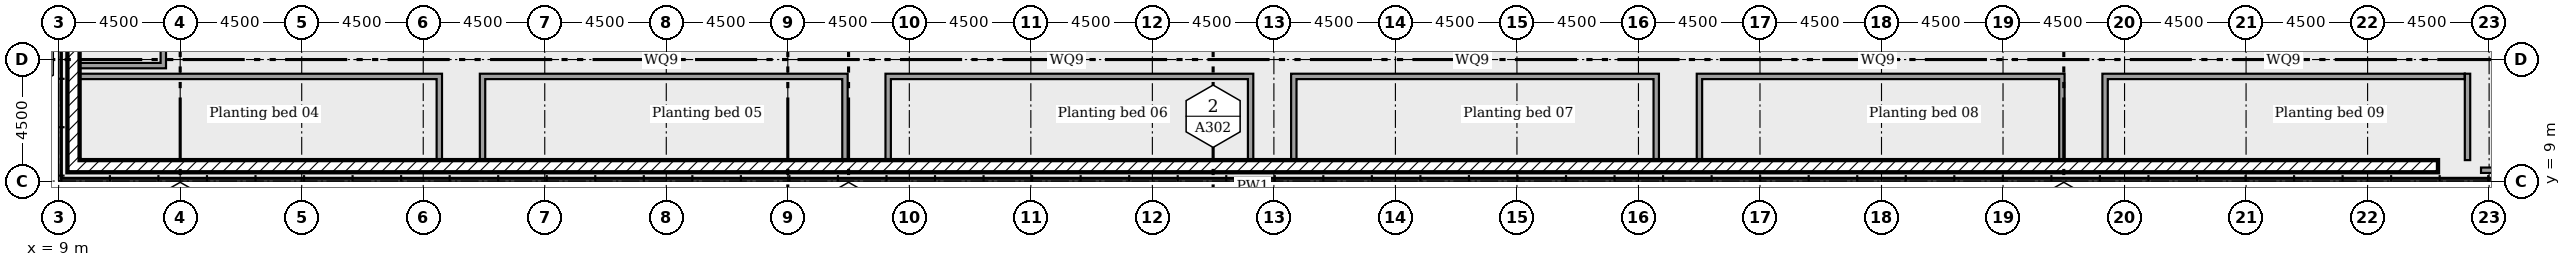
"""IFC4 building model, lengths in metres.
Left out: names, types, materials, properties, quantities, classifications, styles, units other than length and angle.
Written with IfcOpenShell. Run it as: python <this file> out.ifc"""

import sys

from ifc_helpers import new_model, si_unit, direction, frame, frame_2d, origin, place, context, subcontext, project, spatial, rectangle, extrude, element, save


model = new_model("IFC4")
c1 = context("Model", 3, precision=1e-05, world=origin(), true_north=direction((0.0, 1.0)))
c2 = subcontext(c1, "Body", "Model", "MODEL_VIEW")
j1 = project(units=[si_unit("LENGTHUNIT", "METRE"), si_unit("PLANEANGLEUNIT", "RADIAN")], contexts=[c1])
p1 = place(None, origin())
s1 = spatial("IfcSite", under=j1, at=p1, CompositionType="ELEMENT")
p2 = place(p1, origin())
s2 = spatial("IfcBuilding", under=s1, at=p2, CompositionType="ELEMENT")
p3 = place(p2, frame((0.0, 0.0, 11.5)))
s3 = spatial("IfcBuildingStorey", under=s2, at=p3, CompositionType="ELEMENT", Elevation=11.5)
p4 = place(p3, frame((9.325, 9.55, 0.0)))
e1 = element("IfcWall", 1, at=p4, inside=s3, PredefinedType="SOLIDWALL", context=c2, shape_type="SweptSolid", body=[
    extrude(rectangle(XDim=87.782, YDim=0.45, at=frame_2d((43.891, 0.0))), origin(), (0.0, 0.0, 1.0), 0.6),
])
p5 = place(p3, frame((9.55, 89.225, 0.0), z_axis=(0.0, 0.0, 1.0), x_axis=(0.0, -1.0, 0.0)))
e2 = element("IfcWall", 2, at=p5, inside=s3, PredefinedType="SOLIDWALL", context=c2, shape_type="SweptSolid", body=[
    extrude(rectangle(XDim=79.45, YDim=0.45, at=frame_2d((39.725, 0.0))), origin(), (0.0, 0.0, 1.0), 0.6),
])
p6 = place(p3, frame((23.096, 9.775, 0.0), z_axis=(0.0, 0.0, 1.0), x_axis=(0.0, 1.0, 0.0)))
e3 = element("IfcWall", 3, at=p6, inside=s3, PredefinedType="SOLIDWALL", context=c2, shape_type="SweptSolid", body=[
    extrude(rectangle(XDim=3.2, YDim=0.2, at=frame_2d((1.6, 0.0))), origin(), (0.0, 0.0, 1.0), 0.45),
])
p7 = place(p3, frame((9.775, 12.875, 0.0)))
e4 = element("IfcWall", 4, at=p7, inside=s3, PredefinedType="SOLIDWALL", context=c2, shape_type="SweptSolid", body=[
    extrude(rectangle(XDim=13.221, YDim=0.2, at=frame_2d((6.61, 0.0))), origin(), (0.0, 0.0, 1.0), 0.45),
])
p8 = place(p3, frame((38.117, 9.775, 0.0), z_axis=(0.0, 0.0, 1.0), x_axis=(0.0, 1.0, 0.0)))
e5 = element("IfcWall", 5, at=p8, inside=s3, PredefinedType="SOLIDWALL", context=c2, shape_type="SweptSolid", body=[
    extrude(rectangle(XDim=3.2, YDim=0.2, at=frame_2d((1.6, 0.0))), origin(), (0.0, 0.0, 1.0), 0.45),
])
p9 = place(p3, frame((24.596, 12.875, 0.0)))
e6 = element("IfcWall", 6, at=p9, inside=s3, PredefinedType="SOLIDWALL", context=c2, shape_type="SweptSolid", body=[
    extrude(rectangle(XDim=13.421, YDim=0.2, at=frame_2d((6.71, 0.0))), origin(), (0.0, 0.0, 1.0), 0.45),
])
p10 = place(p3, frame((24.696, 9.775, 0.0), z_axis=(0.0, 0.0, 1.0), x_axis=(0.0, 1.0, 0.0)))
e7 = element("IfcWall", 7, at=p10, inside=s3, PredefinedType="SOLIDWALL", context=c2, shape_type="SweptSolid", body=[
    extrude(rectangle(XDim=3.0, YDim=0.2, at=frame_2d((1.5, 0.0))), origin(), (0.0, 0.0, 1.0), 0.45),
])
p11 = place(p3, frame((53.137, 9.775, 0.0), z_axis=(0.0, 0.0, 1.0), x_axis=(0.0, 1.0, 0.0)))
e8 = element("IfcWall", 8, at=p11, inside=s3, PredefinedType="SOLIDWALL", context=c2, shape_type="SweptSolid", body=[
    extrude(rectangle(XDim=3.2, YDim=0.2, at=frame_2d((1.6, 0.0))), origin(), (0.0, 0.0, 1.0), 0.45),
])
p12 = place(p3, frame((39.617, 12.875, 0.0)))
e9 = element("IfcWall", 9, at=p12, inside=s3, PredefinedType="SOLIDWALL", context=c2, shape_type="SweptSolid", body=[
    extrude(rectangle(XDim=13.421, YDim=0.2, at=frame_2d((6.71, 0.0))), origin(), (0.0, 0.0, 1.0), 0.45),
])
p13 = place(p3, frame((39.717, 9.775, 0.0), z_axis=(0.0, 0.0, 1.0), x_axis=(0.0, 1.0, 0.0)))
e10 = element("IfcWall", 10, at=p13, inside=s3, PredefinedType="SOLIDWALL", context=c2, shape_type="SweptSolid", body=[
    extrude(rectangle(XDim=3.0, YDim=0.2, at=frame_2d((1.5, 0.0))), origin(), (0.0, 0.0, 1.0), 0.45),
])
p14 = place(p3, frame((68.158, 9.775, 0.0), z_axis=(0.0, 0.0, 1.0), x_axis=(0.0, 1.0, 0.0)))
e11 = element("IfcWall", 11, at=p14, inside=s3, PredefinedType="SOLIDWALL", context=c2, shape_type="SweptSolid", body=[
    extrude(rectangle(XDim=3.2, YDim=0.2, at=frame_2d((1.6, 0.0))), origin(), (0.0, 0.0, 1.0), 0.45),
])
p15 = place(p3, frame((54.637, 12.875, 0.0)))
e12 = element("IfcWall", 12, at=p15, inside=s3, PredefinedType="SOLIDWALL", context=c2, shape_type="SweptSolid", body=[
    extrude(rectangle(XDim=13.421, YDim=0.2, at=frame_2d((6.71, 0.0))), origin(), (0.0, 0.0, 1.0), 0.45),
])
p16 = place(p3, frame((54.738, 9.775, 0.0), z_axis=(0.0, 0.0, 1.0), x_axis=(0.0, 1.0, 0.0)))
e13 = element("IfcWall", 13, at=p16, inside=s3, PredefinedType="SOLIDWALL", context=c2, shape_type="SweptSolid", body=[
    extrude(rectangle(XDim=3.0, YDim=0.2, at=frame_2d((1.5, 0.0))), origin(), (0.0, 0.0, 1.0), 0.45),
])
p17 = place(p3, frame((83.179, 9.775, 0.0), z_axis=(0.0, 0.0, 1.0), x_axis=(0.0, 1.0, 0.0)))
e14 = element("IfcWall", 14, at=p17, inside=s3, PredefinedType="SOLIDWALL", context=c2, shape_type="SweptSolid", body=[
    extrude(rectangle(XDim=3.2, YDim=0.2, at=frame_2d((1.6, 0.0))), origin(), (0.0, 0.0, 1.0), 0.45),
])
p18 = place(p3, frame((69.658, 12.875, 0.0)))
e15 = element("IfcWall", 15, at=p18, inside=s3, PredefinedType="SOLIDWALL", context=c2, shape_type="SweptSolid", body=[
    extrude(rectangle(XDim=13.421, YDim=0.2, at=frame_2d((6.71, 0.0))), origin(), (0.0, 0.0, 1.0), 0.45),
])
p19 = place(p3, frame((69.758, 9.775, 0.0), z_axis=(0.0, 0.0, 1.0), x_axis=(0.0, 1.0, 0.0)))
e16 = element("IfcWall", 16, at=p19, inside=s3, PredefinedType="SOLIDWALL", context=c2, shape_type="SweptSolid", body=[
    extrude(rectangle(XDim=3.0, YDim=0.2, at=frame_2d((1.5, 0.0))), origin(), (0.0, 0.0, 1.0), 0.45),
])
p20 = place(p3, frame((98.2, 9.775, 0.0), z_axis=(0.0, 0.0, 1.0), x_axis=(0.0, 1.0, 0.0)))
e17 = element("IfcWall", 17, at=p20, inside=s3, PredefinedType="SOLIDWALL", context=c2, shape_type="SweptSolid", body=[
    extrude(rectangle(XDim=3.2, YDim=0.2, at=frame_2d((1.6, 0.0))), origin(), (0.0, 0.0, 1.0), 0.45),
])
p21 = place(p3, frame((84.679, 12.875, 0.0)))
e18 = element("IfcWall", 18, at=p21, inside=s3, PredefinedType="SOLIDWALL", context=c2, shape_type="SweptSolid", body=[
    extrude(rectangle(XDim=13.421, YDim=0.2, at=frame_2d((6.71, 0.0))), origin(), (0.0, 0.0, 1.0), 0.45),
])
p22 = place(p3, frame((84.779, 9.775, 0.0), z_axis=(0.0, 0.0, 1.0), x_axis=(0.0, 1.0, 0.0)))
e19 = element("IfcWall", 19, at=p22, inside=s3, PredefinedType="SOLIDWALL", context=c2, shape_type="SweptSolid", body=[
    extrude(rectangle(XDim=3.0, YDim=0.2, at=frame_2d((1.5, 0.0))), origin(), (0.0, 0.0, 1.0), 0.45),
])
p23 = place(p3, frame((12.875, 13.175, 0.0), z_axis=(0.0, 0.0, 1.0), x_axis=(0.0, 1.0, 0.0)))
e20 = element("IfcWall", 20, at=p23, inside=s3, PredefinedType="SOLIDWALL", context=c2, shape_type="SweptSolid", body=[
    extrude(rectangle(XDim=13.41, YDim=0.2, at=frame_2d((6.705, 0.0))), origin(), (0.0, 0.0, 1.0), 0.45),
])
p24 = place(p3, frame((9.775, 13.275, 0.0)))
e21 = element("IfcWall", 21, at=p24, inside=s3, PredefinedType="SOLIDWALL", context=c2, shape_type="SweptSolid", body=[
    extrude(rectangle(XDim=3.0, YDim=0.2, at=frame_2d((1.5, 0.0))), origin(), (0.0, 0.0, 1.0), 0.45),
])
p25 = place(p3, frame((98.7, 9.4, 0.0)))
e22 = element("IfcWall", 22, at=p25, inside=s3, PredefinedType="SOLIDWALL", context=c2, shape_type="SweptSolid", body=[
    extrude(rectangle(XDim=3.8, YDim=0.2, at=frame_2d((1.9, 0.0))), origin(), (0.0, 0.0, 1.0), 2.3),
])
p26 = place(p25, frame((0.6, 0.0, 0.0)))
e23 = element("IfcOpeningElement", 23, at=p26, cuts=e22, PredefinedType="OPENING", context=c2, shape_type="SweptSolid", body=[
    extrude(rectangle(XDim=2.6, YDim=2.1, at=frame_2d((1.3, 1.05))), frame((0.0, 0.11, 0.0), z_axis=(0.0, -1.0, 0.0), x_axis=(1.0, 0.0, 0.0)), (0.0, 0.0, 1.0), 0.22),
])
save(model, sys.argv[1])
